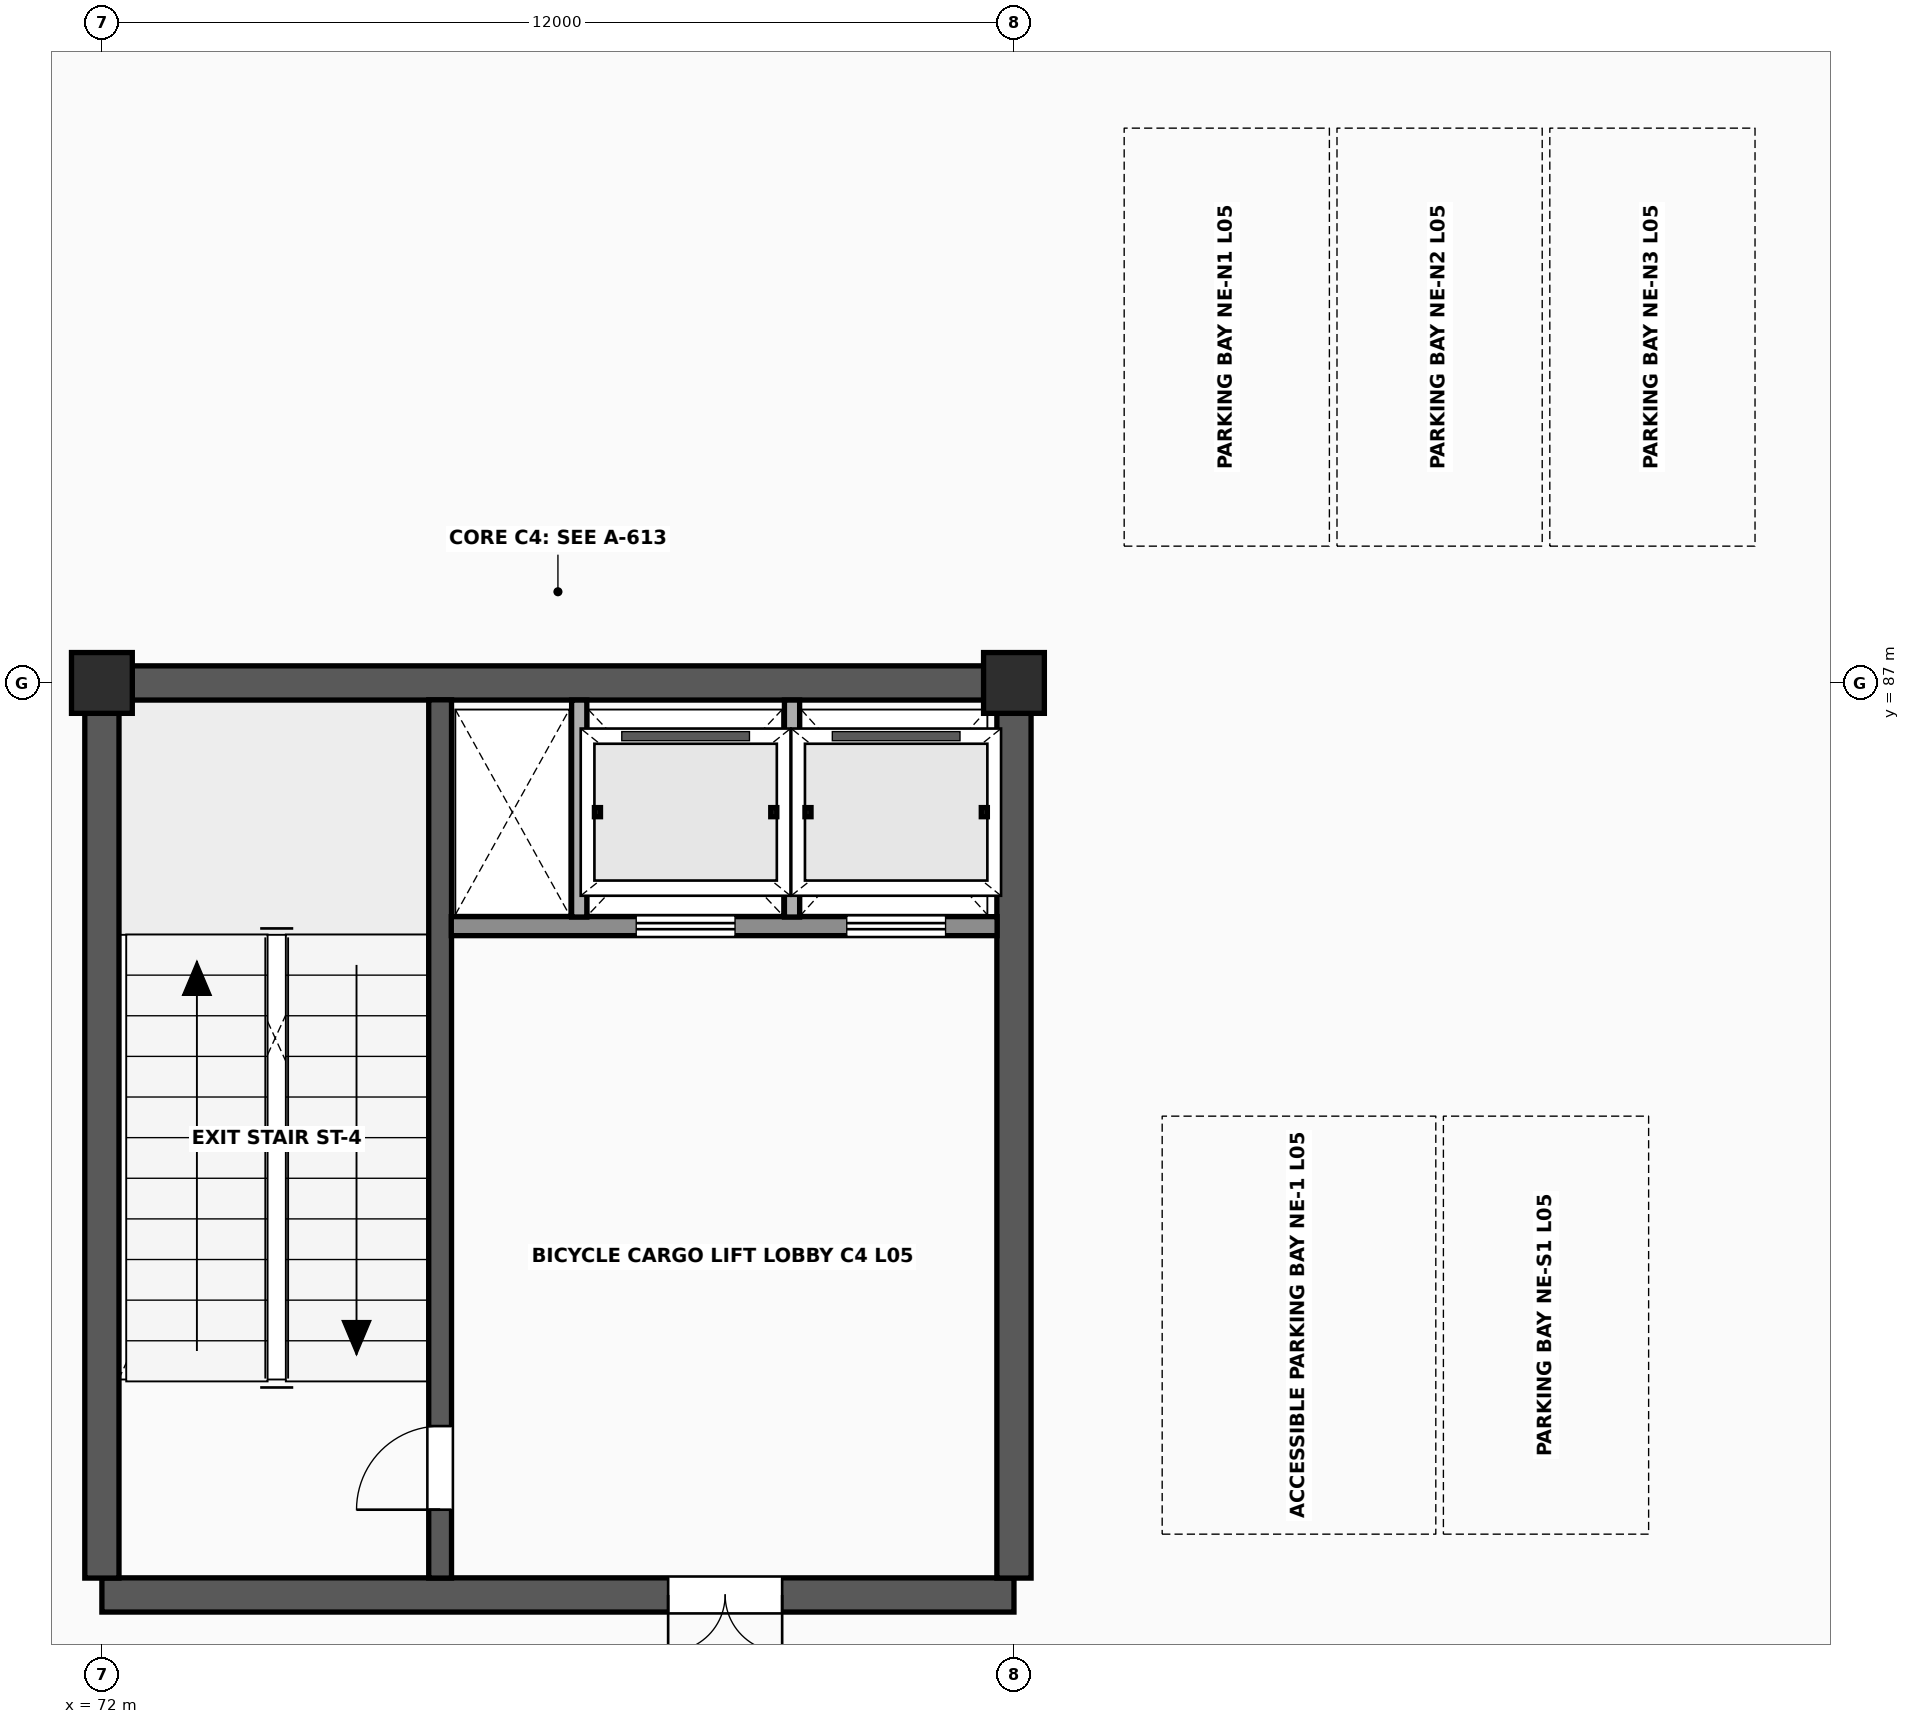
"""IFC4 building model, lengths in metres.
Left out: names, types, materials, properties, quantities, classifications, styles, units other than length and angle.
Written with IfcOpenShell. Run it as: python <this file> out.ifc"""

import sys

from ifc_helpers import new_model, si_unit, direction, frame, frame_2d, origin, origin_2d, place, context, subcontext, project, spatial, rectangle, extrude, element, fill, save


model = new_model("IFC4")
c1 = context("Model", 3, precision=1e-05, world=origin(), true_north=direction((0.0, 1.0)))
c2 = subcontext(c1, "Body", "Model", "MODEL_VIEW")
j1 = project(units=[si_unit("LENGTHUNIT", "METRE"), si_unit("PLANEANGLEUNIT", "RADIAN")], contexts=[c1])
p1 = place(None, origin())
s1 = spatial("IfcSite", under=j1, at=p1, CompositionType="ELEMENT")
p2 = place(p1, origin())
s2 = spatial("IfcBuilding", under=s1, at=p2, CompositionType="ELEMENT")
p3 = place(p2, frame((0.0, 0.0, 21.0)))
s3 = spatial("IfcBuildingStorey", under=s2, at=p3, CompositionType="ELEMENT", Elevation=21.0)
for number, where, z_axis, x_axis in (
    (1, (72.0, 87.0, 0.0), (0.0, 0.0, 1.0), (1.0, 0.0, 0.0)),
    (2, (84.0, 87.0, 0.0), (0.0, 0.0, 1.0), (1.0, 0.0, 0.0)),
):
    element("IfcColumn", number, at=place(p3, frame(where, z_axis=z_axis, x_axis=x_axis)), inside=s3, PredefinedType="COLUMN", context=c2, shape_type="SweptSolid", body=[
        extrude(rectangle(XDim=0.8, YDim=0.8, at=origin_2d()), origin(), (0.0, 0.0, 1.0), 3.8),
    ])
p4 = place(p3, frame((72.0, 75.0, 0.0), z_axis=(0.0, 0.0, 1.0), x_axis=(1.0, 0.0, 0.0)))
e3 = element("IfcWall", 3, at=p4, inside=s3, PredefinedType="SHEAR", context=c2, shape_type="SweptSolid", body=[
    extrude(rectangle(XDim=12.0, YDim=0.45, at=frame_2d((6.0, 0.0))), origin(), (0.0, 0.0, 1.0), 3.638),
])
p5 = place(p4, frame((7.45, 0.0, 0.0)))
e4 = element("IfcOpeningElement", 4, at=p5, cuts=e3, PredefinedType="OPENING", context=c2, shape_type="SweptSolid", body=[
    extrude(rectangle(XDim=1.5, YDim=2.25, at=frame_2d((0.75, 1.125))), frame((0.0, 0.24, 0.0), z_axis=(0.0, -1.0, 0.0), x_axis=(1.0, 0.0, 0.0)), (0.0, 0.0, 1.0), 0.48),
])
p6 = place(p3, frame((72.397, 87.0, 0.0), z_axis=(0.0, 0.0, 1.0), x_axis=(1.0, 0.0, 0.0)))
e5 = element("IfcWall", 5, at=p6, inside=s3, PredefinedType="SHEAR", context=c2, shape_type="SweptSolid", body=[
    extrude(rectangle(XDim=11.206, YDim=0.45, at=frame_2d((5.603, 0.0))), origin(), (0.0, 0.0, 1.0), 3.638),
])
for number, where, z_axis, x_axis in (
    (6, (72.0, 75.222, 0.0), (0.0, 0.0, 1.0), (0.0, 1.0, 0.0)),
    (7, (84.0, 75.222, 0.0), (0.0, 0.0, 1.0), (0.0, 1.0, 0.0)),
):
    element("IfcWall", number, at=place(p3, frame(where, z_axis=z_axis, x_axis=x_axis)), inside=s3, PredefinedType="SHEAR", context=c2, shape_type="SweptSolid", body=[
        extrude(rectangle(XDim=11.381, YDim=0.45, at=frame_2d((5.69, 0.0))), origin(), (0.0, 0.0, 1.0), 3.638),
    ])
p7 = place(p3, frame((76.45, 75.222, 0.0), z_axis=(0.0, 0.0, 1.0), x_axis=(0.0, 1.0, 0.0)))
e8 = element("IfcWall", 8, at=p7, inside=s3, PredefinedType="SHEAR", context=c2, shape_type="SweptSolid", body=[
    extrude(rectangle(XDim=11.556, YDim=0.3, at=frame_2d((5.778, 0.0))), origin(), (0.0, 0.0, 1.0), 3.638),
])
p8 = place(p7, frame((0.9, 0.0, 0.0)))
e9 = element("IfcOpeningElement", 9, at=p8, cuts=e8, PredefinedType="OPENING", context=c2, shape_type="SweptSolid", body=[
    extrude(rectangle(XDim=1.1, YDim=2.2, at=frame_2d((0.55, 1.1))), frame((0.0, 0.165, 0.0), z_axis=(0.0, -1.0, 0.0), x_axis=(1.0, 0.0, 0.0)), (0.0, 0.0, 1.0), 0.33),
])
p9 = place(p3, frame((76.597, 83.8, 0.0), z_axis=(0.0, 0.0, 1.0), x_axis=(1.0, 0.0, 0.0)))
e10 = element("IfcWall", 10, at=p9, inside=s3, PredefinedType="SOLIDWALL", context=c2, shape_type="SweptSolid", body=[
    extrude(rectangle(XDim=7.181, YDim=0.25, at=frame_2d((3.591, 0.0))), origin(), (0.0, 0.0, 1.0), 3.638),
])
p10 = place(p9, frame((2.433, 0.0, 0.0)))
e11 = element("IfcOpeningElement", 11, at=p10, cuts=e10, PredefinedType="OPENING", context=c2, shape_type="SweptSolid", body=[
    extrude(rectangle(XDim=1.3, YDim=2.28, at=frame_2d((0.65, 1.14))), frame((0.0, 0.14, 0.0), z_axis=(0.0, -1.0, 0.0), x_axis=(1.0, 0.0, 0.0)), (0.0, 0.0, 1.0), 0.28),
])
p11 = place(p9, frame((5.203, 0.0, 0.0)))
e12 = element("IfcOpeningElement", 12, at=p11, cuts=e10, PredefinedType="OPENING", context=c2, shape_type="SweptSolid", body=[
    extrude(rectangle(XDim=1.3, YDim=2.28, at=frame_2d((0.65, 1.14))), frame((0.0, 0.14, 0.0), z_axis=(0.0, -1.0, 0.0), x_axis=(1.0, 0.0, 0.0)), (0.0, 0.0, 1.0), 0.28),
])
for number, where, z_axis, x_axis in (
    (13, (78.28, 83.92, 0.0), (0.0, 0.0, 1.0), (0.0, 1.0, 0.0)),
    (14, (81.08, 83.92, 0.0), (0.0, 0.0, 1.0), (0.0, 1.0, 0.0)),
):
    element("IfcWall", number, at=place(p3, frame(where, z_axis=z_axis, x_axis=x_axis)), inside=s3, PredefinedType="SOLIDWALL", context=c2, shape_type="SweptSolid", body=[
        extrude(rectangle(XDim=2.855, YDim=0.2, at=frame_2d((1.427, 0.0))), origin(), (0.0, 0.0, 1.0), 3.628),
    ])
p12 = place(p8, origin())
e15 = element("IfcDoor", 15, at=p12, inside=s3, OperationType="SINGLE_SWING_LEFT", PredefinedType="DOOR", context=c2, shape_type="SweptSolid", body=[
    extrude(rectangle(XDim=1.1, YDim=2.2, at=frame_2d((0.55, 1.1))), frame((0.0, 0.025, 0.0), z_axis=(0.0, -1.0, 0.0), x_axis=(1.0, 0.0, 0.0)), (0.0, 0.0, 1.0), 0.05),
])
fill(e9, e15)
p13 = place(p5, origin())
e16 = element("IfcDoor", 16, at=p13, inside=s3, OperationType="DOUBLE_DOOR_SINGLE_SWING", PredefinedType="DOOR", context=c2, shape_type="SweptSolid", body=[
    extrude(rectangle(XDim=1.5, YDim=2.25, at=frame_2d((0.75, 1.125))), frame((0.0, 0.025, 0.0), z_axis=(0.0, -1.0, 0.0), x_axis=(1.0, 0.0, 0.0)), (0.0, 0.0, 1.0), 0.05),
])
fill(e4, e16)
p14 = place(p10, origin())
e17 = element("IfcDoor", 17, at=p14, inside=s3, OperationType="SLIDING_TO_LEFT", PredefinedType="USERDEFINED", context=c2, shape_type="SweptSolid", body=[
    extrude(rectangle(XDim=1.3, YDim=2.28, at=frame_2d((0.65, 1.14))), frame((0.0, 0.025, 0.0), z_axis=(0.0, -1.0, 0.0), x_axis=(1.0, 0.0, 0.0)), (0.0, 0.0, 1.0), 0.05),
])
fill(e11, e17)
p15 = place(p11, origin())
e18 = element("IfcDoor", 18, at=p15, inside=s3, OperationType="SLIDING_TO_LEFT", PredefinedType="USERDEFINED", context=c2, shape_type="SweptSolid", body=[
    extrude(rectangle(XDim=1.3, YDim=2.28, at=frame_2d((0.65, 1.14))), frame((0.0, 0.025, 0.0), z_axis=(0.0, -1.0, 0.0), x_axis=(1.0, 0.0, 0.0)), (0.0, 0.0, 1.0), 0.05),
])
fill(e12, e18)
save(model, sys.argv[1])
